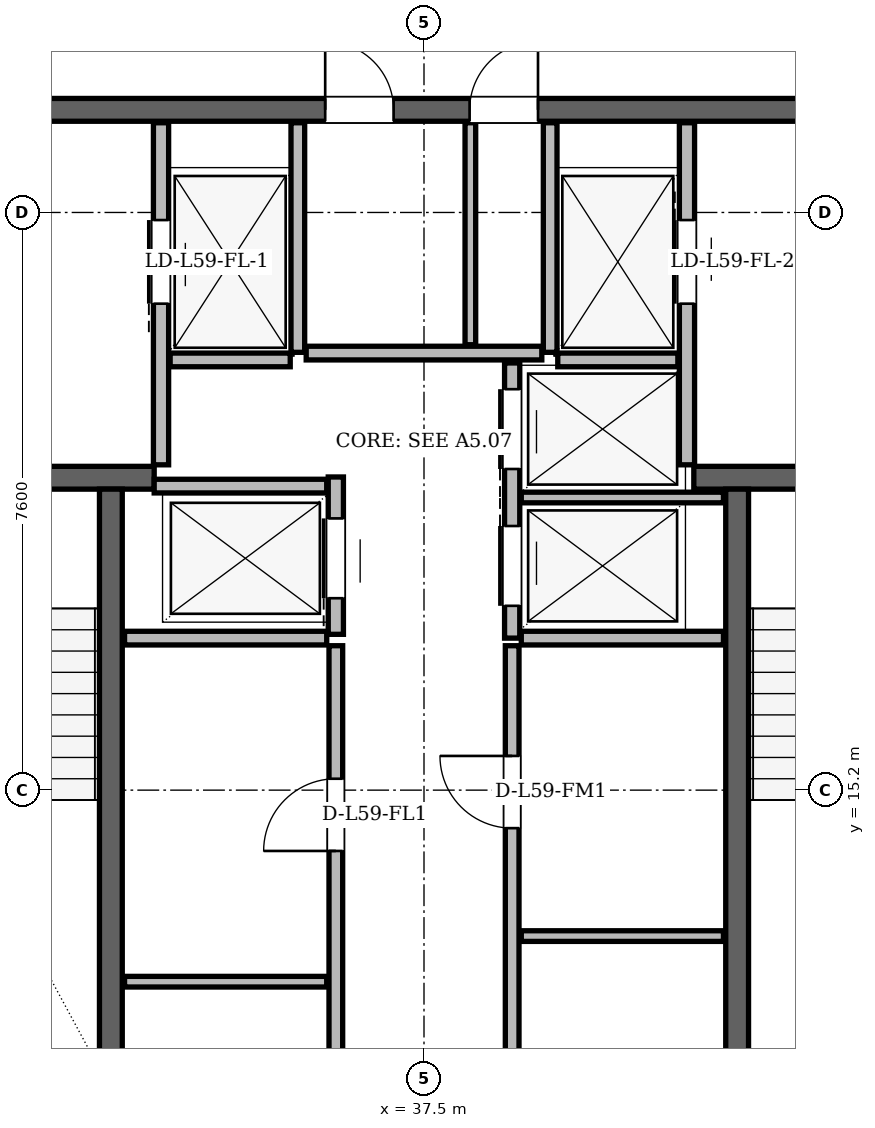
"""IFC4 building model, lengths in metres.
Left out: names, types, materials, properties, quantities, classifications, styles, units other than length and angle.
Written with IfcOpenShell. Run it as: python <this file> out.ifc"""

import sys

from ifc_helpers import new_model, si_unit, direction, frame, frame_2d, origin, place, context, subcontext, project, spatial, rectangle, extrude, element, fill, save


model = new_model("IFC4")
c1 = context("Model", 3, precision=1e-05, world=origin(), true_north=direction((0.0, 1.0)))
c2 = subcontext(c1, "Body", "Model", "MODEL_VIEW")
j1 = project(units=[si_unit("LENGTHUNIT", "METRE"), si_unit("PLANEANGLEUNIT", "RADIAN")], contexts=[c1])
p1 = place(None, origin())
s1 = spatial("IfcSite", under=j1, at=p1, CompositionType="ELEMENT")
p2 = place(p1, origin())
s2 = spatial("IfcBuilding", under=s1, at=p2, CompositionType="ELEMENT")
p3 = place(p2, frame((0.0, 0.0, 223.5)))
s3 = spatial("IfcBuildingStorey", under=s2, at=p3, CompositionType="ELEMENT", Elevation=223.5)
p4 = place(p3, frame((29.65, 24.15, 0.0), z_axis=(0.0, 0.0, 1.0), x_axis=(1.0, 0.0, 0.0)))
e1 = element("IfcWall", 1, at=p4, inside=s3, PredefinedType="SHEAR", context=c2, shape_type="SweptSolid", body=[
    extrude(rectangle(XDim=15.7, YDim=0.3, at=frame_2d((7.85, 0.0))), origin(), (0.0, 0.0, 1.0), 3.38),
])
p5 = place(p4, frame((1.7, 0.0, 0.0)))
e2 = element("IfcOpeningElement", 2, at=p5, cuts=e1, PredefinedType="OPENING", context=c2, shape_type="SweptSolid", body=[
    extrude(rectangle(XDim=1.2, YDim=2.2, at=frame_2d((0.6, 1.1))), frame((0.0, 0.15, 0.0), z_axis=(0.0, -1.0, 0.0), x_axis=(1.0, 0.0, 0.0)), (0.0, 0.0, 1.0), 0.3),
])
p6 = place(p4, frame((12.8, 0.0, 0.0)))
e3 = element("IfcOpeningElement", 3, at=p6, cuts=e1, PredefinedType="OPENING", context=c2, shape_type="SweptSolid", body=[
    extrude(rectangle(XDim=1.2, YDim=2.2, at=frame_2d((0.6, 1.1))), frame((0.0, 0.15, 0.0), z_axis=(0.0, -1.0, 0.0), x_axis=(1.0, 0.0, 0.0)), (0.0, 0.0, 1.0), 0.3),
])
p7 = place(p4, frame((6.55, 0.0, 0.0)))
e4 = element("IfcOpeningElement", 4, at=p7, cuts=e1, PredefinedType="OPENING", context=c2, shape_type="SweptSolid", body=[
    extrude(rectangle(XDim=0.9, YDim=2.05, at=frame_2d((0.45, 1.025))), frame((0.0, 0.15, 0.0), z_axis=(0.0, -1.0, 0.0), x_axis=(1.0, 0.0, 0.0)), (0.0, 0.0, 1.0), 0.3),
])
p8 = place(p4, frame((8.45, 0.0, 0.0)))
e5 = element("IfcOpeningElement", 5, at=p8, cuts=e1, PredefinedType="OPENING", context=c2, shape_type="SweptSolid", body=[
    extrude(rectangle(XDim=0.9, YDim=2.05, at=frame_2d((0.45, 1.025))), frame((0.0, 0.15, 0.0), z_axis=(0.0, -1.0, 0.0), x_axis=(1.0, 0.0, 0.0)), (0.0, 0.0, 1.0), 0.3),
])
p9 = place(p3, frame((29.94, 19.31, 0.0), z_axis=(0.0, 0.0, 1.0), x_axis=(1.0, 0.0, 0.0)))
e6 = element("IfcWall", 6, at=p9, inside=s3, PredefinedType="SHEAR", context=c2, shape_type="SweptSolid", body=[
    extrude(rectangle(XDim=4.01, YDim=0.3, at=frame_2d((2.005, 0.0))), origin(), (0.0, 0.0, 1.0), 3.38),
])
p10 = place(p9, frame((1.01, 0.0, 0.0)))
e7 = element("IfcOpeningElement", 7, at=p10, cuts=e6, PredefinedType="OPENING", context=c2, shape_type="SweptSolid", body=[
    extrude(rectangle(XDim=1.4, YDim=2.2, at=frame_2d((0.7, 1.1))), frame((0.0, 0.15, 0.0), z_axis=(0.0, -1.0, 0.0), x_axis=(1.0, 0.0, 0.0)), (0.0, 0.0, 1.0), 0.3),
])
p11 = place(p3, frame((41.05, 19.31, 0.0), z_axis=(0.0, 0.0, 1.0), x_axis=(1.0, 0.0, 0.0)))
e8 = element("IfcWall", 8, at=p11, inside=s3, PredefinedType="SHEAR", context=c2, shape_type="SweptSolid", body=[
    extrude(rectangle(XDim=4.01, YDim=0.3, at=frame_2d((2.005, 0.0))), origin(), (0.0, 0.0, 1.0), 3.38),
])
p12 = place(p11, frame((1.6, 0.0, 0.0)))
e9 = element("IfcOpeningElement", 9, at=p12, cuts=e8, PredefinedType="OPENING", context=c2, shape_type="SweptSolid", body=[
    extrude(rectangle(XDim=1.4, YDim=2.2, at=frame_2d((0.7, 1.1))), frame((0.0, 0.15, 0.0), z_axis=(0.0, -1.0, 0.0), x_axis=(1.0, 0.0, 0.0)), (0.0, 0.0, 1.0), 0.3),
])
for number, where, z_axis, x_axis in (
    (10, (33.38, 11.54, 0.0), (0.0, 0.0, 1.0), (0.0, 1.0, 0.0)),
    (11, (41.62, 11.54, 0.0), (0.0, 0.0, 1.0), (0.0, 1.0, 0.0)),
):
    element("IfcWall", number, at=place(p3, frame(where, z_axis=z_axis, x_axis=x_axis)), inside=s3, PredefinedType="SHEAR", context=c2, shape_type="SweptSolid", body=[
        extrude(rectangle(XDim=7.62, YDim=0.3, at=frame_2d((3.81, 0.0))), origin(), (0.0, 0.0, 1.0), 3.38),
    ])
p13 = place(p3, frame((59.07, 11.372, 0.0), z_axis=(0.0, 0.0, 1.0), x_axis=(-0.500000292553, 0.866025234879, 0.0)))
e12 = element("IfcWall", 12, at=p13, inside=s3, PredefinedType="SOLIDWALL", context=c2, shape_type="SweptSolid", body=[
    extrude(rectangle(XDim=36.688, YDim=0.29, at=frame_2d((18.344, 0.0))), origin(), (0.0, 0.0, 1.0), 2.677),
])
p14 = place(p13, frame((3.429, 0.0, 0.0)))
e13 = element("IfcOpeningElement", 13, at=p14, cuts=e12, PredefinedType="OPENING", context=c2, shape_type="SweptSolid", body=[
    extrude(rectangle(XDim=1.5, YDim=2.2, at=frame_2d((0.75, 1.1))), frame((0.0, 0.145, 0.0), z_axis=(0.0, -1.0, 0.0), x_axis=(1.0, 0.0, 0.0)), (0.0, 0.0, 1.0), 0.29),
])
p15 = place(p13, frame((27.154, 0.0, 0.0)))
e14 = element("IfcOpeningElement", 14, at=p15, cuts=e12, PredefinedType="OPENING", context=c2, shape_type="SweptSolid", body=[
    extrude(rectangle(XDim=1.5, YDim=2.2, at=frame_2d((0.75, 1.1))), frame((0.0, 0.145, 0.0), z_axis=(0.0, -1.0, 0.0), x_axis=(1.0, 0.0, 0.0)), (0.0, 0.0, 1.0), 0.29),
])
p16 = place(p13, frame((7.878, 0.0, 0.85)))
e15 = element("IfcOpeningElement", 15, at=p16, cuts=e12, PredefinedType="OPENING", context=c2, shape_type="SweptSolid", body=[
    extrude(rectangle(XDim=1.2, YDim=1.48, at=frame_2d((0.6, 0.74))), frame((0.0, 0.145, 0.0), z_axis=(0.0, -1.0, 0.0), x_axis=(1.0, 0.0, 0.0)), (0.0, 0.0, 1.0), 0.29),
])
p17 = place(p13, frame((1.266, 0.0, 0.85)))
e16 = element("IfcOpeningElement", 16, at=p17, cuts=e12, PredefinedType="OPENING", context=c2, shape_type="SweptSolid", body=[
    extrude(rectangle(XDim=1.2, YDim=1.48, at=frame_2d((0.6, 0.74))), frame((0.0, 0.145, 0.0), z_axis=(0.0, -1.0, 0.0), x_axis=(1.0, 0.0, 0.0)), (0.0, 0.0, 1.0), 0.29),
])
p18 = place(p13, frame((12.232, 0.0, 0.85)))
e17 = element("IfcOpeningElement", 17, at=p18, cuts=e12, PredefinedType="OPENING", context=c2, shape_type="SweptSolid", body=[
    extrude(rectangle(XDim=2.0, YDim=1.717, at=frame_2d((1.0, 0.858))), frame((0.0, 0.145, 0.0), z_axis=(0.0, -1.0, 0.0), x_axis=(1.0, 0.0, 0.0)), (0.0, 0.0, 1.0), 0.29),
])
p19 = place(p13, frame((17.268, 0.0, 0.85)))
e18 = element("IfcOpeningElement", 18, at=p19, cuts=e12, PredefinedType="OPENING", context=c2, shape_type="SweptSolid", body=[
    extrude(rectangle(XDim=1.4, YDim=1.6, at=frame_2d((0.7, 0.8))), frame((0.0, 0.145, 0.0), z_axis=(0.0, -1.0, 0.0), x_axis=(1.0, 0.0, 0.0)), (0.0, 0.0, 1.0), 0.29),
])
p20 = place(p13, frame((20.594, 0.0, 0.85)))
e19 = element("IfcOpeningElement", 19, at=p20, cuts=e12, PredefinedType="OPENING", context=c2, shape_type="SweptSolid", body=[
    extrude(rectangle(XDim=1.2, YDim=1.48, at=frame_2d((0.6, 0.74))), frame((0.0, 0.145, 0.0), z_axis=(0.0, -1.0, 0.0), x_axis=(1.0, 0.0, 0.0)), (0.0, 0.0, 1.0), 0.29),
])
p21 = place(p13, frame((34.312, 0.0, 0.85)))
e20 = element("IfcOpeningElement", 20, at=p21, cuts=e12, PredefinedType="OPENING", context=c2, shape_type="SweptSolid", body=[
    extrude(rectangle(XDim=1.2, YDim=1.48, at=frame_2d((0.6, 0.74))), frame((0.0, 0.145, 0.0), z_axis=(0.0, -1.0, 0.0), x_axis=(1.0, 0.0, 0.0)), (0.0, 0.0, 1.0), 0.29),
])
p22 = place(p3, frame((34.274, 43.144, 0.0), z_axis=(0.0, 0.0, 1.0), x_axis=(-0.500000292553, -0.866025234879, 0.0)))
e21 = element("IfcWall", 21, at=p22, inside=s3, PredefinedType="SOLIDWALL", context=c2, shape_type="SweptSolid", body=[
    extrude(rectangle(XDim=36.688, YDim=0.29, at=frame_2d((18.344, 0.0))), origin(), (0.0, 0.0, 1.0), 2.677),
])
p23 = place(p22, frame((3.429, 0.0, 0.0)))
e22 = element("IfcOpeningElement", 22, at=p23, cuts=e21, PredefinedType="OPENING", context=c2, shape_type="SweptSolid", body=[
    extrude(rectangle(XDim=1.5, YDim=2.2, at=frame_2d((0.75, 1.1))), frame((0.0, 0.145, 0.0), z_axis=(0.0, -1.0, 0.0), x_axis=(1.0, 0.0, 0.0)), (0.0, 0.0, 1.0), 0.29),
])
p24 = place(p22, frame((27.154, 0.0, 0.0)))
e23 = element("IfcOpeningElement", 23, at=p24, cuts=e21, PredefinedType="OPENING", context=c2, shape_type="SweptSolid", body=[
    extrude(rectangle(XDim=1.5, YDim=2.2, at=frame_2d((0.75, 1.1))), frame((0.0, 0.145, 0.0), z_axis=(0.0, -1.0, 0.0), x_axis=(1.0, 0.0, 0.0)), (0.0, 0.0, 1.0), 0.29),
])
p25 = place(p22, frame((22.893, 0.0, 0.85)))
e24 = element("IfcOpeningElement", 24, at=p25, cuts=e21, PredefinedType="OPENING", context=c2, shape_type="SweptSolid", body=[
    extrude(rectangle(XDim=1.2, YDim=1.48, at=frame_2d((0.6, 0.74))), frame((0.0, 0.145, 0.0), z_axis=(0.0, -1.0, 0.0), x_axis=(1.0, 0.0, 0.0)), (0.0, 0.0, 1.0), 0.29),
])
p26 = place(p22, frame((33.124, 0.0, 0.85)))
e25 = element("IfcOpeningElement", 25, at=p26, cuts=e21, PredefinedType="OPENING", context=c2, shape_type="SweptSolid", body=[
    extrude(rectangle(XDim=1.2, YDim=1.48, at=frame_2d((0.6, 0.74))), frame((0.0, 0.145, 0.0), z_axis=(0.0, -1.0, 0.0), x_axis=(1.0, 0.0, 0.0)), (0.0, 0.0, 1.0), 0.29),
])
p27 = place(p22, frame((8.469, 0.0, 0.85)))
e26 = element("IfcOpeningElement", 26, at=p27, cuts=e21, PredefinedType="OPENING", context=c2, shape_type="SweptSolid", body=[
    extrude(rectangle(XDim=1.2, YDim=1.48, at=frame_2d((0.6, 0.74))), frame((0.0, 0.145, 0.0), z_axis=(0.0, -1.0, 0.0), x_axis=(1.0, 0.0, 0.0)), (0.0, 0.0, 1.0), 0.29),
])
p28 = place(p22, frame((15.521, 0.0, 0.85)))
e27 = element("IfcOpeningElement", 27, at=p28, cuts=e21, PredefinedType="OPENING", context=c2, shape_type="SweptSolid", body=[
    extrude(rectangle(XDim=2.8, YDim=1.717, at=frame_2d((1.4, 0.858))), frame((0.0, 0.145, 0.0), z_axis=(0.0, -1.0, 0.0), x_axis=(1.0, 0.0, 0.0)), (0.0, 0.0, 1.0), 0.29),
])
p29 = place(p22, frame((1.499, 0.0, 0.85)))
e28 = element("IfcOpeningElement", 28, at=p29, cuts=e21, PredefinedType="OPENING", context=c2, shape_type="SweptSolid", body=[
    extrude(rectangle(XDim=1.2, YDim=1.48, at=frame_2d((0.6, 0.74))), frame((0.0, 0.145, 0.0), z_axis=(0.0, -1.0, 0.0), x_axis=(1.0, 0.0, 0.0)), (0.0, 0.0, 1.0), 0.29),
])
p30 = place(p3, frame((34.04, 19.48, 0.0), z_axis=(0.0, 0.0, 1.0), x_axis=(0.0, 1.0, 0.0)))
e29 = element("IfcWall", 29, at=p30, inside=s3, PredefinedType="PARTITIONING", context=c2, shape_type="SweptSolid", body=[
    extrude(rectangle(XDim=4.5, YDim=0.2, at=frame_2d((2.25, 0.0))), origin(), (0.0, 0.0, 1.0), 3.38),
])
p31 = place(p30, frame((2.12, 0.0, 0.0)))
e30 = element("IfcOpeningElement", 30, at=p31, cuts=e29, PredefinedType="OPENING", context=c2, shape_type="SweptSolid", body=[
    extrude(rectangle(XDim=1.1, YDim=2.2, at=frame_2d((0.55, 1.1))), frame((0.0, 0.1, 0.0), z_axis=(0.0, -1.0, 0.0), x_axis=(1.0, 0.0, 0.0)), (0.0, 0.0, 1.0), 0.2),
])
p32 = place(p3, frame((35.84, 20.96, 0.0), z_axis=(0.0, 0.0, 1.0), x_axis=(0.0, 1.0, 0.0)))
e31 = element("IfcWall", 31, at=p32, inside=s3, PredefinedType="PARTITIONING", context=c2, shape_type="SweptSolid", body=[
    extrude(rectangle(XDim=3.02, YDim=0.18, at=frame_2d((1.51, 0.0))), origin(), (0.0, 0.0, 1.0), 3.38),
])
p33 = place(p3, frame((34.16, 20.86, 0.0), z_axis=(0.0, 0.0, 1.0), x_axis=(1.0, 0.0, 0.0)))
e32 = element("IfcWall", 32, at=p33, inside=s3, PredefinedType="PARTITIONING", context=c2, shape_type="SweptSolid", body=[
    extrude(rectangle(XDim=1.58, YDim=0.18, at=frame_2d((0.79, 0.0))), origin(), (0.0, 0.0, 1.0), 3.38),
])
p34 = place(p3, frame((40.96, 19.48, 0.0), z_axis=(0.0, 0.0, 1.0), x_axis=(0.0, 1.0, 0.0)))
e33 = element("IfcWall", 33, at=p34, inside=s3, PredefinedType="PARTITIONING", context=c2, shape_type="SweptSolid", body=[
    extrude(rectangle(XDim=4.5, YDim=0.2, at=frame_2d((2.25, 0.0))), origin(), (0.0, 0.0, 1.0), 3.38),
])
p35 = place(p34, frame((2.12, 0.0, 0.0)))
e34 = element("IfcOpeningElement", 34, at=p35, cuts=e33, PredefinedType="OPENING", context=c2, shape_type="SweptSolid", body=[
    extrude(rectangle(XDim=1.1, YDim=2.2, at=frame_2d((0.55, 1.1))), frame((0.0, 0.1, 0.0), z_axis=(0.0, -1.0, 0.0), x_axis=(1.0, 0.0, 0.0)), (0.0, 0.0, 1.0), 0.2),
])
p36 = place(p3, frame((39.16, 20.96, 0.0), z_axis=(0.0, 0.0, 1.0), x_axis=(0.0, 1.0, 0.0)))
e35 = element("IfcWall", 35, at=p36, inside=s3, PredefinedType="PARTITIONING", context=c2, shape_type="SweptSolid", body=[
    extrude(rectangle(XDim=3.02, YDim=0.18, at=frame_2d((1.51, 0.0))), origin(), (0.0, 0.0, 1.0), 3.38),
])
p37 = place(p3, frame((39.26, 20.86, 0.0), z_axis=(0.0, 0.0, 1.0), x_axis=(1.0, 0.0, 0.0)))
e36 = element("IfcWall", 36, at=p37, inside=s3, PredefinedType="PARTITIONING", context=c2, shape_type="SweptSolid", body=[
    extrude(rectangle(XDim=1.58, YDim=0.18, at=frame_2d((0.79, 0.0))), origin(), (0.0, 0.0, 1.0), 3.38),
])
p38 = place(p3, frame((36.34, 17.25, 0.0), z_axis=(0.0, 0.0, 1.0), x_axis=(0.0, 1.0, 0.0)))
e37 = element("IfcWall", 37, at=p38, inside=s3, PredefinedType="PARTITIONING", context=c2, shape_type="SweptSolid", body=[
    extrude(rectangle(XDim=2.07, YDim=0.2, at=frame_2d((1.035, 0.0))), origin(), (0.0, 0.0, 1.0), 3.38),
])
p39 = place(p38, frame((0.475, 0.0, 0.0)))
e38 = element("IfcOpeningElement", 38, at=p39, cuts=e37, PredefinedType="OPENING", context=c2, shape_type="SweptSolid", body=[
    extrude(rectangle(XDim=1.05, YDim=2.15, at=frame_2d((0.525, 1.075))), frame((0.0, 0.1, 0.0), z_axis=(0.0, -1.0, 0.0), x_axis=(1.0, 0.0, 0.0)), (0.0, 0.0, 1.0), 0.2),
])
p40 = place(p3, frame((33.95, 19.2, 0.0), z_axis=(0.0, 0.0, 1.0), x_axis=(1.0, 0.0, 0.0)))
e39 = element("IfcWall", 39, at=p40, inside=s3, PredefinedType="PARTITIONING", context=c2, shape_type="SweptSolid", body=[
    extrude(rectangle(XDim=2.27, YDim=0.18, at=frame_2d((1.135, 0.0))), origin(), (0.0, 0.0, 1.0), 3.38),
])
p41 = place(p3, frame((33.56, 17.2, 0.0), z_axis=(0.0, 0.0, 1.0), x_axis=(1.0, 0.0, 0.0)))
e40 = element("IfcWall", 40, at=p41, inside=s3, PredefinedType="PARTITIONING", context=c2, shape_type="SweptSolid", body=[
    extrude(rectangle(XDim=2.66, YDim=0.18, at=frame_2d((1.33, 0.0))), origin(), (0.0, 0.0, 1.0), 3.38),
])
p42 = place(p3, frame((36.34, 11.55, 0.0), z_axis=(0.0, 0.0, 1.0), x_axis=(0.0, 1.0, 0.0)))
e41 = element("IfcWall", 41, at=p42, inside=s3, PredefinedType="PARTITIONING", context=c2, shape_type="SweptSolid", body=[
    extrude(rectangle(XDim=5.55, YDim=0.18, at=frame_2d((2.775, 0.0))), origin(), (0.0, 0.0, 1.0), 3.38),
])
p43 = place(p42, frame((2.85, 0.0, 0.0)))
e42 = element("IfcOpeningElement", 42, at=p43, cuts=e41, PredefinedType="OPENING", context=c2, shape_type="SweptSolid", body=[
    extrude(rectangle(XDim=0.95, YDim=2.1, at=frame_2d((0.475, 1.05))), frame((0.0, 0.09, 0.0), z_axis=(0.0, -1.0, 0.0), x_axis=(1.0, 0.0, 0.0)), (0.0, 0.0, 1.0), 0.18),
])
p44 = place(p3, frame((33.56, 12.68, 0.0), z_axis=(0.0, 0.0, 1.0), x_axis=(1.0, 0.0, 0.0)))
e43 = element("IfcWall", 43, at=p44, inside=s3, PredefinedType="PARTITIONING", context=c2, shape_type="SweptSolid", body=[
    extrude(rectangle(XDim=2.66, YDim=0.14, at=frame_2d((1.33, 0.0))), origin(), (0.0, 0.0, 1.0), 3.38),
])
p45 = place(p3, frame((38.66, 17.2, 0.0), z_axis=(0.0, 0.0, 1.0), x_axis=(0.0, 1.0, 0.0)))
e44 = element("IfcWall", 44, at=p45, inside=s3, PredefinedType="PARTITIONING", context=c2, shape_type="SweptSolid", body=[
    extrude(rectangle(XDim=3.62, YDim=0.2, at=frame_2d((1.81, 0.0))), origin(), (0.0, 0.0, 1.0), 3.38),
])
p46 = place(p45, frame((0.425, 0.0, 0.0)))
e45 = element("IfcOpeningElement", 45, at=p46, cuts=e44, PredefinedType="OPENING", context=c2, shape_type="SweptSolid", body=[
    extrude(rectangle(XDim=1.05, YDim=2.15, at=frame_2d((0.525, 1.075))), frame((0.0, 0.1, 0.0), z_axis=(0.0, -1.0, 0.0), x_axis=(1.0, 0.0, 0.0)), (0.0, 0.0, 1.0), 0.2),
])
p47 = place(p45, frame((2.225, 0.0, 0.0)))
e46 = element("IfcOpeningElement", 46, at=p47, cuts=e44, PredefinedType="OPENING", context=c2, shape_type="SweptSolid", body=[
    extrude(rectangle(XDim=1.05, YDim=2.15, at=frame_2d((0.525, 1.075))), frame((0.0, 0.1, 0.0), z_axis=(0.0, -1.0, 0.0), x_axis=(1.0, 0.0, 0.0)), (0.0, 0.0, 1.0), 0.2),
])
p48 = place(p3, frame((38.78, 17.2, 0.0), z_axis=(0.0, 0.0, 1.0), x_axis=(1.0, 0.0, 0.0)))
e47 = element("IfcWall", 47, at=p48, inside=s3, PredefinedType="PARTITIONING", context=c2, shape_type="SweptSolid", body=[
    extrude(rectangle(XDim=2.66, YDim=0.18, at=frame_2d((1.33, 0.0))), origin(), (0.0, 0.0, 1.0), 3.38),
])
p49 = place(p3, frame((38.78, 19.05, 0.0), z_axis=(0.0, 0.0, 1.0), x_axis=(1.0, 0.0, 0.0)))
e48 = element("IfcWall", 48, at=p49, inside=s3, PredefinedType="PARTITIONING", context=c2, shape_type="SweptSolid", body=[
    extrude(rectangle(XDim=2.66, YDim=0.14, at=frame_2d((1.33, 0.0))), origin(), (0.0, 0.0, 1.0), 3.38),
])
p50 = place(p3, frame((38.66, 11.55, 0.0), z_axis=(0.0, 0.0, 1.0), x_axis=(0.0, 1.0, 0.0)))
e49 = element("IfcWall", 49, at=p50, inside=s3, PredefinedType="PARTITIONING", context=c2, shape_type="SweptSolid", body=[
    extrude(rectangle(XDim=5.55, YDim=0.18, at=frame_2d((2.775, 0.0))), origin(), (0.0, 0.0, 1.0), 3.38),
])
p51 = place(p50, frame((3.15, 0.0, 0.0)))
e50 = element("IfcOpeningElement", 50, at=p51, cuts=e49, PredefinedType="OPENING", context=c2, shape_type="SweptSolid", body=[
    extrude(rectangle(XDim=0.95, YDim=2.1, at=frame_2d((0.475, 1.05))), frame((0.0, 0.09, 0.0), z_axis=(0.0, -1.0, 0.0), x_axis=(1.0, 0.0, 0.0)), (0.0, 0.0, 1.0), 0.18),
])
p52 = place(p3, frame((38.78, 13.28, 0.0), z_axis=(0.0, 0.0, 1.0), x_axis=(1.0, 0.0, 0.0)))
e51 = element("IfcWall", 51, at=p52, inside=s3, PredefinedType="PARTITIONING", context=c2, shape_type="SweptSolid", body=[
    extrude(rectangle(XDim=2.66, YDim=0.14, at=frame_2d((1.33, 0.0))), origin(), (0.0, 0.0, 1.0), 3.38),
])
p53 = place(p3, frame((35.95, 20.95, 0.0), z_axis=(0.0, 0.0, 1.0), x_axis=(1.0, 0.0, 0.0)))
e52 = element("IfcWall", 52, at=p53, inside=s3, PredefinedType="PARTITIONING", context=c2, shape_type="SweptSolid", body=[
    extrude(rectangle(XDim=3.1, YDim=0.18, at=frame_2d((1.55, 0.0))), origin(), (0.0, 0.0, 1.0), 3.38),
])
p54 = place(p3, frame((38.11, 21.06, 0.0), z_axis=(0.0, 0.0, 1.0), x_axis=(0.0, 1.0, 0.0)))
e53 = element("IfcWall", 53, at=p54, inside=s3, PredefinedType="PARTITIONING", context=c2, shape_type="SweptSolid", body=[
    extrude(rectangle(XDim=2.92, YDim=0.14, at=frame_2d((1.46, 0.0))), origin(), (0.0, 0.0, 1.0), 3.38),
])
p55 = place(p43, origin())
e54 = element("IfcDoor", 54, at=p55, inside=s3, OperationType="SINGLE_SWING_LEFT", PredefinedType="DOOR", context=c2, shape_type="SweptSolid", body=[
    extrude(rectangle(XDim=0.95, YDim=2.1, at=frame_2d((0.475, 1.05))), frame((0.0, 0.025, 0.0), z_axis=(0.0, -1.0, 0.0), x_axis=(1.0, 0.0, 0.0)), (0.0, 0.0, 1.0), 0.05),
])
fill(e42, e54)
p56 = place(p51, origin())
e55 = element("IfcDoor", 55, at=p56, inside=s3, OperationType="SINGLE_SWING_RIGHT", PredefinedType="DOOR", context=c2, shape_type="SweptSolid", body=[
    extrude(rectangle(XDim=0.95, YDim=2.1, at=frame_2d((0.475, 1.05))), frame((0.0, 0.025, 0.0), z_axis=(0.0, -1.0, 0.0), x_axis=(1.0, 0.0, 0.0)), (0.0, 0.0, 1.0), 0.05),
])
fill(e50, e55)
p57 = place(p31, origin())
e56 = element("IfcDoor", 56, at=p57, inside=s3, OperationType="SLIDING_TO_LEFT", PredefinedType="DOOR", context=c2, shape_type="SweptSolid", body=[
    extrude(rectangle(XDim=1.1, YDim=2.2, at=frame_2d((0.55, 1.1))), frame((0.0, 0.025, 0.0), z_axis=(0.0, -1.0, 0.0), x_axis=(1.0, 0.0, 0.0)), (0.0, 0.0, 1.0), 0.05),
])
fill(e30, e56)
p58 = place(p35, origin())
e57 = element("IfcDoor", 57, at=p58, inside=s3, OperationType="SLIDING_TO_RIGHT", PredefinedType="DOOR", context=c2, shape_type="SweptSolid", body=[
    extrude(rectangle(XDim=1.1, YDim=2.2, at=frame_2d((0.55, 1.1))), frame((0.0, 0.025, 0.0), z_axis=(0.0, -1.0, 0.0), x_axis=(1.0, 0.0, 0.0)), (0.0, 0.0, 1.0), 0.05),
])
fill(e34, e57)
p59 = place(p39, origin())
e58 = element("IfcDoor", 58, at=p59, inside=s3, OperationType="SLIDING_TO_LEFT", PredefinedType="DOOR", context=c2, shape_type="SweptSolid", body=[
    extrude(rectangle(XDim=1.05, YDim=2.15, at=frame_2d((0.525, 1.075))), frame((0.0, 0.025, 0.0), z_axis=(0.0, -1.0, 0.0), x_axis=(1.0, 0.0, 0.0)), (0.0, 0.0, 1.0), 0.05),
])
fill(e38, e58)
p60 = place(p46, origin())
e59 = element("IfcDoor", 59, at=p60, inside=s3, OperationType="SLIDING_TO_RIGHT", PredefinedType="DOOR", context=c2, shape_type="SweptSolid", body=[
    extrude(rectangle(XDim=1.05, YDim=2.15, at=frame_2d((0.525, 1.075))), frame((0.0, 0.025, 0.0), z_axis=(0.0, -1.0, 0.0), x_axis=(1.0, 0.0, 0.0)), (0.0, 0.0, 1.0), 0.05),
])
fill(e45, e59)
p61 = place(p47, origin())
e60 = element("IfcDoor", 60, at=p61, inside=s3, OperationType="SLIDING_TO_LEFT", PredefinedType="DOOR", context=c2, shape_type="SweptSolid", body=[
    extrude(rectangle(XDim=1.05, YDim=2.15, at=frame_2d((0.525, 1.075))), frame((0.0, 0.025, 0.0), z_axis=(0.0, -1.0, 0.0), x_axis=(1.0, 0.0, 0.0)), (0.0, 0.0, 1.0), 0.05),
])
fill(e46, e60)
p62 = place(p7, origin())
e61 = element("IfcDoor", 61, at=p62, inside=s3, OperationType="SINGLE_SWING_LEFT", PredefinedType="DOOR", context=c2, shape_type="SweptSolid", body=[
    extrude(rectangle(XDim=0.9, YDim=2.05, at=frame_2d((0.45, 1.025))), frame((0.0, 0.025, 0.0), z_axis=(0.0, -1.0, 0.0), x_axis=(1.0, 0.0, 0.0)), (0.0, 0.0, 1.0), 0.05),
])
fill(e4, e61)
p63 = place(p8, origin())
e62 = element("IfcDoor", 62, at=p63, inside=s3, OperationType="SINGLE_SWING_RIGHT", PredefinedType="DOOR", context=c2, shape_type="SweptSolid", body=[
    extrude(rectangle(XDim=0.9, YDim=2.05, at=frame_2d((0.45, 1.025))), frame((0.0, 0.025, 0.0), z_axis=(0.0, -1.0, 0.0), x_axis=(1.0, 0.0, 0.0)), (0.0, 0.0, 1.0), 0.05),
])
fill(e5, e62)
save(model, sys.argv[1])
